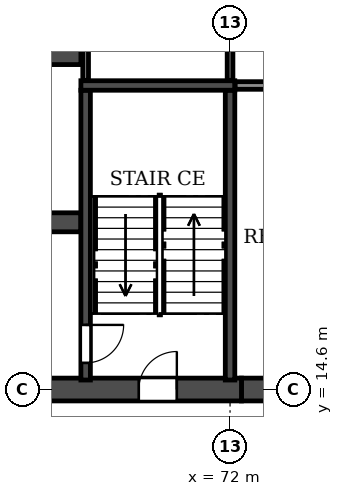
"""IFC4 building model, lengths in metres.
Left out: names, types, materials, properties, quantities, classifications, styles, units other than length and angle.
Written with IfcOpenShell. Run it as: python <this file> out.ifc"""

import sys

from ifc_helpers import new_model, si_unit, direction, frame, frame_2d, origin, place, context, subcontext, project, spatial, rectangle, extrude, element, fill, save


model = new_model("IFC4")
c1 = context("Model", 3, precision=1e-05, world=origin(), true_north=direction((0.0, 1.0)))
c2 = subcontext(c1, "Body", "Model", "MODEL_VIEW")
j1 = project(units=[si_unit("LENGTHUNIT", "METRE"), si_unit("PLANEANGLEUNIT", "RADIAN")], contexts=[c1])
p1 = place(None, origin())
s1 = spatial("IfcSite", under=j1, at=p1, CompositionType="ELEMENT")
p2 = place(p1, origin())
s2 = spatial("IfcBuilding", under=s1, at=p2, CompositionType="ELEMENT")
p3 = place(p2, frame((0.0, 0.0, 115.8)))
s3 = spatial("IfcBuildingStorey", under=s2, at=p3, CompositionType="ELEMENT", Elevation=115.8)
p4 = place(p3, frame((72.3, 14.6, 0.0), z_axis=(0.0, 0.0, 1.0), x_axis=(1.0, 0.0, 0.0)))
e1 = element("IfcWall", 1, at=p4, inside=s3, PredefinedType="SHEAR", context=c2, shape_type="SweptSolid", body=[
    extrude(rectangle(XDim=4.8, YDim=0.6, at=frame_2d((2.4, 0.0))), origin(), (0.0, 0.0, 1.0), 6.37),
])
p5 = place(p4, frame((1.9, 0.0, 0.0)))
e2 = element("IfcOpeningElement", 2, at=p5, cuts=e1, PredefinedType="OPENING", context=c2, shape_type="SweptSolid", body=[
    extrude(rectangle(XDim=1.0, YDim=2.1, at=frame_2d((0.5, 1.05))), frame((0.0, 0.31, 0.0), z_axis=(0.0, -1.0, 0.0), x_axis=(1.0, 0.0, 0.0)), (0.0, 0.0, 1.0), 0.62),
])
p6 = place(p3, frame((29.7, 14.6, 0.0), z_axis=(0.0, 0.0, 1.0), x_axis=(1.0, 0.0, 0.0)))
e3 = element("IfcWall", 3, at=p6, inside=s3, PredefinedType="SOLIDWALL", context=c2, shape_type="SweptSolid", body=[
    extrude(rectangle(XDim=42.6, YDim=0.6, at=frame_2d((21.3, 0.0))), origin(), (0.0, 0.0, 1.0), 6.37),
])
p7 = place(p6, frame((1.7, 0.0, 0.0)))
e4 = element("IfcOpeningElement", 4, at=p7, cuts=e3, PredefinedType="OPENING", context=c2, shape_type="SweptSolid", body=[
    extrude(rectangle(XDim=1.0, YDim=2.1, at=frame_2d((0.5, 1.05))), frame((0.0, 0.31, 0.0), z_axis=(0.0, -1.0, 0.0), x_axis=(1.0, 0.0, 0.0)), (0.0, 0.0, 1.0), 0.62),
])
p8 = place(p6, frame((14.3, 0.0, 0.0)))
e5 = element("IfcOpeningElement", 5, at=p8, cuts=e3, PredefinedType="OPENING", context=c2, shape_type="SweptSolid", body=[
    extrude(rectangle(XDim=1.0, YDim=2.1, at=frame_2d((0.5, 1.05))), frame((0.0, 0.31, 0.0), z_axis=(0.0, -1.0, 0.0), x_axis=(1.0, 0.0, 0.0)), (0.0, 0.0, 1.0), 0.62),
])
p9 = place(p6, frame((18.2, 0.0, 0.0)))
e6 = element("IfcOpeningElement", 6, at=p9, cuts=e3, PredefinedType="OPENING", context=c2, shape_type="SweptSolid", body=[
    extrude(rectangle(XDim=1.0, YDim=2.1, at=frame_2d((0.5, 1.05))), frame((0.0, 0.31, 0.0), z_axis=(0.0, -1.0, 0.0), x_axis=(1.0, 0.0, 0.0)), (0.0, 0.0, 1.0), 0.62),
])
p10 = place(p6, frame((20.8, 0.0, 0.0)))
e7 = element("IfcOpeningElement", 7, at=p10, cuts=e3, PredefinedType="OPENING", context=c2, shape_type="SweptSolid", body=[
    extrude(rectangle(XDim=1.0, YDim=2.1, at=frame_2d((0.5, 1.05))), frame((0.0, 0.31, 0.0), z_axis=(0.0, -1.0, 0.0), x_axis=(1.0, 0.0, 0.0)), (0.0, 0.0, 1.0), 0.62),
])
p11 = place(p6, frame((26.0, 0.0, 0.0)))
e8 = element("IfcOpeningElement", 8, at=p11, cuts=e3, PredefinedType="OPENING", context=c2, shape_type="SweptSolid", body=[
    extrude(rectangle(XDim=1.0, YDim=2.1, at=frame_2d((0.5, 1.05))), frame((0.0, 0.31, 0.0), z_axis=(0.0, -1.0, 0.0), x_axis=(1.0, 0.0, 0.0)), (0.0, 0.0, 1.0), 0.62),
])
p12 = place(p6, frame((39.9, 0.0, 0.0)))
e9 = element("IfcOpeningElement", 9, at=p12, cuts=e3, PredefinedType="OPENING", context=c2, shape_type="SweptSolid", body=[
    extrude(rectangle(XDim=1.0, YDim=2.1, at=frame_2d((0.5, 1.05))), frame((0.0, 0.31, 0.0), z_axis=(0.0, -1.0, 0.0), x_axis=(1.0, 0.0, 0.0)), (0.0, 0.0, 1.0), 0.62),
])
p13 = place(p3, frame((33.925, 19.0, 0.0), z_axis=(0.0, 0.0, 1.0), x_axis=(1.0, 0.0, 0.0)))
e10 = element("IfcWall", 10, at=p13, inside=s3, PredefinedType="SOLIDWALL", context=c2, shape_type="SweptSolid", body=[
    extrude(rectangle(XDim=34.15, YDim=0.5, at=frame_2d((17.075, 0.0))), origin(), (0.0, 0.0, 1.0), 6.37),
])
p14 = place(p13, frame((16.175, 0.0, 0.0)))
e11 = element("IfcOpeningElement", 11, at=p14, cuts=e10, PredefinedType="OPENING", context=c2, shape_type="SweptSolid", body=[
    extrude(rectangle(XDim=1.8, YDim=2.1, at=frame_2d((0.9, 1.05))), frame((0.0, 0.26, 0.0), z_axis=(0.0, -1.0, 0.0), x_axis=(1.0, 0.0, 0.0)), (0.0, 0.0, 1.0), 0.52),
])
p15 = place(p13, frame((1.525, 0.0, 0.0)))
e12 = element("IfcOpeningElement", 12, at=p15, cuts=e10, PredefinedType="OPENING", context=c2, shape_type="SweptSolid", body=[
    extrude(rectangle(XDim=1.8, YDim=2.1, at=frame_2d((0.9, 1.05))), frame((0.0, 0.26, 0.0), z_axis=(0.0, -1.0, 0.0), x_axis=(1.0, 0.0, 0.0)), (0.0, 0.0, 1.0), 0.52),
])
p16 = place(p13, frame((30.825, 0.0, 0.0)))
e13 = element("IfcOpeningElement", 13, at=p16, cuts=e10, PredefinedType="OPENING", context=c2, shape_type="SweptSolid", body=[
    extrude(rectangle(XDim=1.8, YDim=2.1, at=frame_2d((0.9, 1.05))), frame((0.0, 0.26, 0.0), z_axis=(0.0, -1.0, 0.0), x_axis=(1.0, 0.0, 0.0)), (0.0, 0.0, 1.0), 0.52),
])
p17 = place(p3, frame((33.925, 23.4, 0.0), z_axis=(0.0, 0.0, 1.0), x_axis=(1.0, 0.0, 0.0)))
e14 = element("IfcWall", 14, at=p17, inside=s3, PredefinedType="SOLIDWALL", context=c2, shape_type="SweptSolid", body=[
    extrude(rectangle(XDim=34.15, YDim=0.5, at=frame_2d((17.075, 0.0))), origin(), (0.0, 0.0, 1.0), 6.37),
])
p18 = place(p17, frame((16.175, 0.0, 0.0)))
e15 = element("IfcOpeningElement", 15, at=p18, cuts=e14, PredefinedType="OPENING", context=c2, shape_type="SweptSolid", body=[
    extrude(rectangle(XDim=1.8, YDim=2.1, at=frame_2d((0.9, 1.05))), frame((0.0, 0.26, 0.0), z_axis=(0.0, -1.0, 0.0), x_axis=(1.0, 0.0, 0.0)), (0.0, 0.0, 1.0), 0.52),
])
p19 = place(p17, frame((0.625, 0.0, 0.0)))
e16 = element("IfcOpeningElement", 16, at=p19, cuts=e14, PredefinedType="OPENING", context=c2, shape_type="SweptSolid", body=[
    extrude(rectangle(XDim=1.1, YDim=2.1, at=frame_2d((0.55, 1.05))), frame((0.0, 0.26, 0.0), z_axis=(0.0, -1.0, 0.0), x_axis=(1.0, 0.0, 0.0)), (0.0, 0.0, 1.0), 0.52),
])
p20 = place(p17, frame((3.225, 0.0, 0.0)))
e17 = element("IfcOpeningElement", 17, at=p20, cuts=e14, PredefinedType="OPENING", context=c2, shape_type="SweptSolid", body=[
    extrude(rectangle(XDim=1.1, YDim=2.1, at=frame_2d((0.55, 1.05))), frame((0.0, 0.26, 0.0), z_axis=(0.0, -1.0, 0.0), x_axis=(1.0, 0.0, 0.0)), (0.0, 0.0, 1.0), 0.52),
])
p21 = place(p17, frame((5.825, 0.0, 0.0)))
e18 = element("IfcOpeningElement", 18, at=p21, cuts=e14, PredefinedType="OPENING", context=c2, shape_type="SweptSolid", body=[
    extrude(rectangle(XDim=1.1, YDim=2.1, at=frame_2d((0.55, 1.05))), frame((0.0, 0.26, 0.0), z_axis=(0.0, -1.0, 0.0), x_axis=(1.0, 0.0, 0.0)), (0.0, 0.0, 1.0), 0.52),
])
p22 = place(p17, frame((8.425, 0.0, 0.0)))
e19 = element("IfcOpeningElement", 19, at=p22, cuts=e14, PredefinedType="OPENING", context=c2, shape_type="SweptSolid", body=[
    extrude(rectangle(XDim=1.1, YDim=2.1, at=frame_2d((0.55, 1.05))), frame((0.0, 0.26, 0.0), z_axis=(0.0, -1.0, 0.0), x_axis=(1.0, 0.0, 0.0)), (0.0, 0.0, 1.0), 0.52),
])
p23 = place(p17, frame((11.025, 0.0, 0.0)))
e20 = element("IfcOpeningElement", 20, at=p23, cuts=e14, PredefinedType="OPENING", context=c2, shape_type="SweptSolid", body=[
    extrude(rectangle(XDim=1.1, YDim=2.1, at=frame_2d((0.55, 1.05))), frame((0.0, 0.26, 0.0), z_axis=(0.0, -1.0, 0.0), x_axis=(1.0, 0.0, 0.0)), (0.0, 0.0, 1.0), 0.52),
])
p24 = place(p17, frame((13.625, 0.0, 0.0)))
e21 = element("IfcOpeningElement", 21, at=p24, cuts=e14, PredefinedType="OPENING", context=c2, shape_type="SweptSolid", body=[
    extrude(rectangle(XDim=1.1, YDim=2.1, at=frame_2d((0.55, 1.05))), frame((0.0, 0.26, 0.0), z_axis=(0.0, -1.0, 0.0), x_axis=(1.0, 0.0, 0.0)), (0.0, 0.0, 1.0), 0.52),
])
p25 = place(p17, frame((19.425, 0.0, 0.0)))
e22 = element("IfcOpeningElement", 22, at=p25, cuts=e14, PredefinedType="OPENING", context=c2, shape_type="SweptSolid", body=[
    extrude(rectangle(XDim=1.1, YDim=2.1, at=frame_2d((0.55, 1.05))), frame((0.0, 0.26, 0.0), z_axis=(0.0, -1.0, 0.0), x_axis=(1.0, 0.0, 0.0)), (0.0, 0.0, 1.0), 0.52),
])
p26 = place(p17, frame((22.025, 0.0, 0.0)))
e23 = element("IfcOpeningElement", 23, at=p26, cuts=e14, PredefinedType="OPENING", context=c2, shape_type="SweptSolid", body=[
    extrude(rectangle(XDim=1.1, YDim=2.1, at=frame_2d((0.55, 1.05))), frame((0.0, 0.26, 0.0), z_axis=(0.0, -1.0, 0.0), x_axis=(1.0, 0.0, 0.0)), (0.0, 0.0, 1.0), 0.52),
])
p27 = place(p17, frame((27.225, 0.0, 0.0)))
e24 = element("IfcOpeningElement", 24, at=p27, cuts=e14, PredefinedType="OPENING", context=c2, shape_type="SweptSolid", body=[
    extrude(rectangle(XDim=1.1, YDim=2.1, at=frame_2d((0.55, 1.05))), frame((0.0, 0.26, 0.0), z_axis=(0.0, -1.0, 0.0), x_axis=(1.0, 0.0, 0.0)), (0.0, 0.0, 1.0), 0.52),
])
p28 = place(p3, frame((68.2, 14.85, 0.0), z_axis=(0.0, 0.0, 1.0), x_axis=(0.0, 1.0, 0.0)))
e25 = element("IfcWall", 25, at=p28, inside=s3, PredefinedType="SOLIDWALL", context=c2, shape_type="SweptSolid", body=[
    extrude(rectangle(XDim=7.625, YDim=0.25, at=frame_2d((3.812, 0.0))), origin(), (0.0, 0.0, 1.0), 6.37),
])
p29 = place(p28, frame((0.45, 0.0, 0.0)))
e26 = element("IfcOpeningElement", 26, at=p29, cuts=e25, PredefinedType="OPENING", context=c2, shape_type="SweptSolid", body=[
    extrude(rectangle(XDim=1.0, YDim=2.1, at=frame_2d((0.5, 1.05))), frame((0.0, 0.135, 0.0), z_axis=(0.0, -1.0, 0.0), x_axis=(1.0, 0.0, 0.0)), (0.0, 0.0, 1.0), 0.27),
])
p30 = place(p3, frame((72.0, 14.85, 0.0), z_axis=(0.0, 0.0, 1.0), x_axis=(0.0, 1.0, 0.0)))
e27 = element("IfcWall", 27, at=p30, inside=s3, PredefinedType="SOLIDWALL", context=c2, shape_type="SweptSolid", body=[
    extrude(rectangle(XDim=7.625, YDim=0.25, at=frame_2d((3.812, 0.0))), origin(), (0.0, 0.0, 1.0), 6.37),
])
p31 = place(p3, frame((68.075, 22.6, 0.0), z_axis=(0.0, 0.0, 1.0), x_axis=(1.0, 0.0, 0.0)))
e28 = element("IfcWall", 28, at=p31, inside=s3, PredefinedType="SOLIDWALL", context=c2, shape_type="SweptSolid", body=[
    extrude(rectangle(XDim=4.05, YDim=0.25, at=frame_2d((2.025, 0.0))), origin(), (0.0, 0.0, 1.0), 6.37),
])
p32 = place(p3, frame((72.135, 22.6, 0.0), z_axis=(0.0, 0.0, 1.0), x_axis=(1.0, 0.0, 0.0)))
e29 = element("IfcWall", 29, at=p32, inside=s3, PredefinedType="PARTITIONING", context=c2, shape_type="SweptSolid", body=[
    extrude(rectangle(XDim=5.13, YDim=0.2, at=frame_2d((2.565, 0.0))), origin(), (0.0, 0.0, 1.0), 6.37),
])
for number, where, z_axis, x_axis in (
    (30, (68.2, 22.735, 0.0), (0.0, 0.0, 1.0), (0.0, 1.0, 0.0)),
    (31, (72.0, 22.735, 0.0), (0.0, 0.0, 1.0), (0.0, 1.0, 0.0)),
):
    element("IfcWall", number, at=place(p3, frame(where, z_axis=z_axis, x_axis=x_axis)), inside=s3, PredefinedType="PARTITIONING", context=c2, shape_type="SweptSolid", body=[
        extrude(rectangle(XDim=4.755, YDim=0.15, at=frame_2d((2.377, 0.0))), origin(), (0.0, 0.0, 1.0), 6.37),
    ])
p33 = place(p12, origin())
e32 = element("IfcDoor", 32, at=p33, inside=s3, OperationType="SINGLE_SWING_RIGHT", PredefinedType="DOOR", context=c2, shape_type="SweptSolid", body=[
    extrude(rectangle(XDim=1.0, YDim=2.1, at=frame_2d((0.5, 1.05))), frame((0.0, 0.025, 0.0), z_axis=(0.0, -1.0, 0.0), x_axis=(1.0, 0.0, 0.0)), (0.0, 0.0, 1.0), 0.05),
])
fill(e9, e32)
p34 = place(p29, frame((1.0, 0.0, 0.0), z_axis=(0.0, 0.0, 1.0), x_axis=(-1.0, 0.0, 0.0)))
e33 = element("IfcDoor", 33, at=p34, inside=s3, OperationType="SINGLE_SWING_LEFT", PredefinedType="DOOR", context=c2, shape_type="SweptSolid", body=[
    extrude(rectangle(XDim=1.0, YDim=2.1, at=frame_2d((0.5, 1.05))), frame((0.0, 0.025, 0.0), z_axis=(0.0, -1.0, 0.0), x_axis=(1.0, 0.0, 0.0)), (0.0, 0.0, 1.0), 0.05),
])
fill(e26, e33)
save(model, sys.argv[1])
